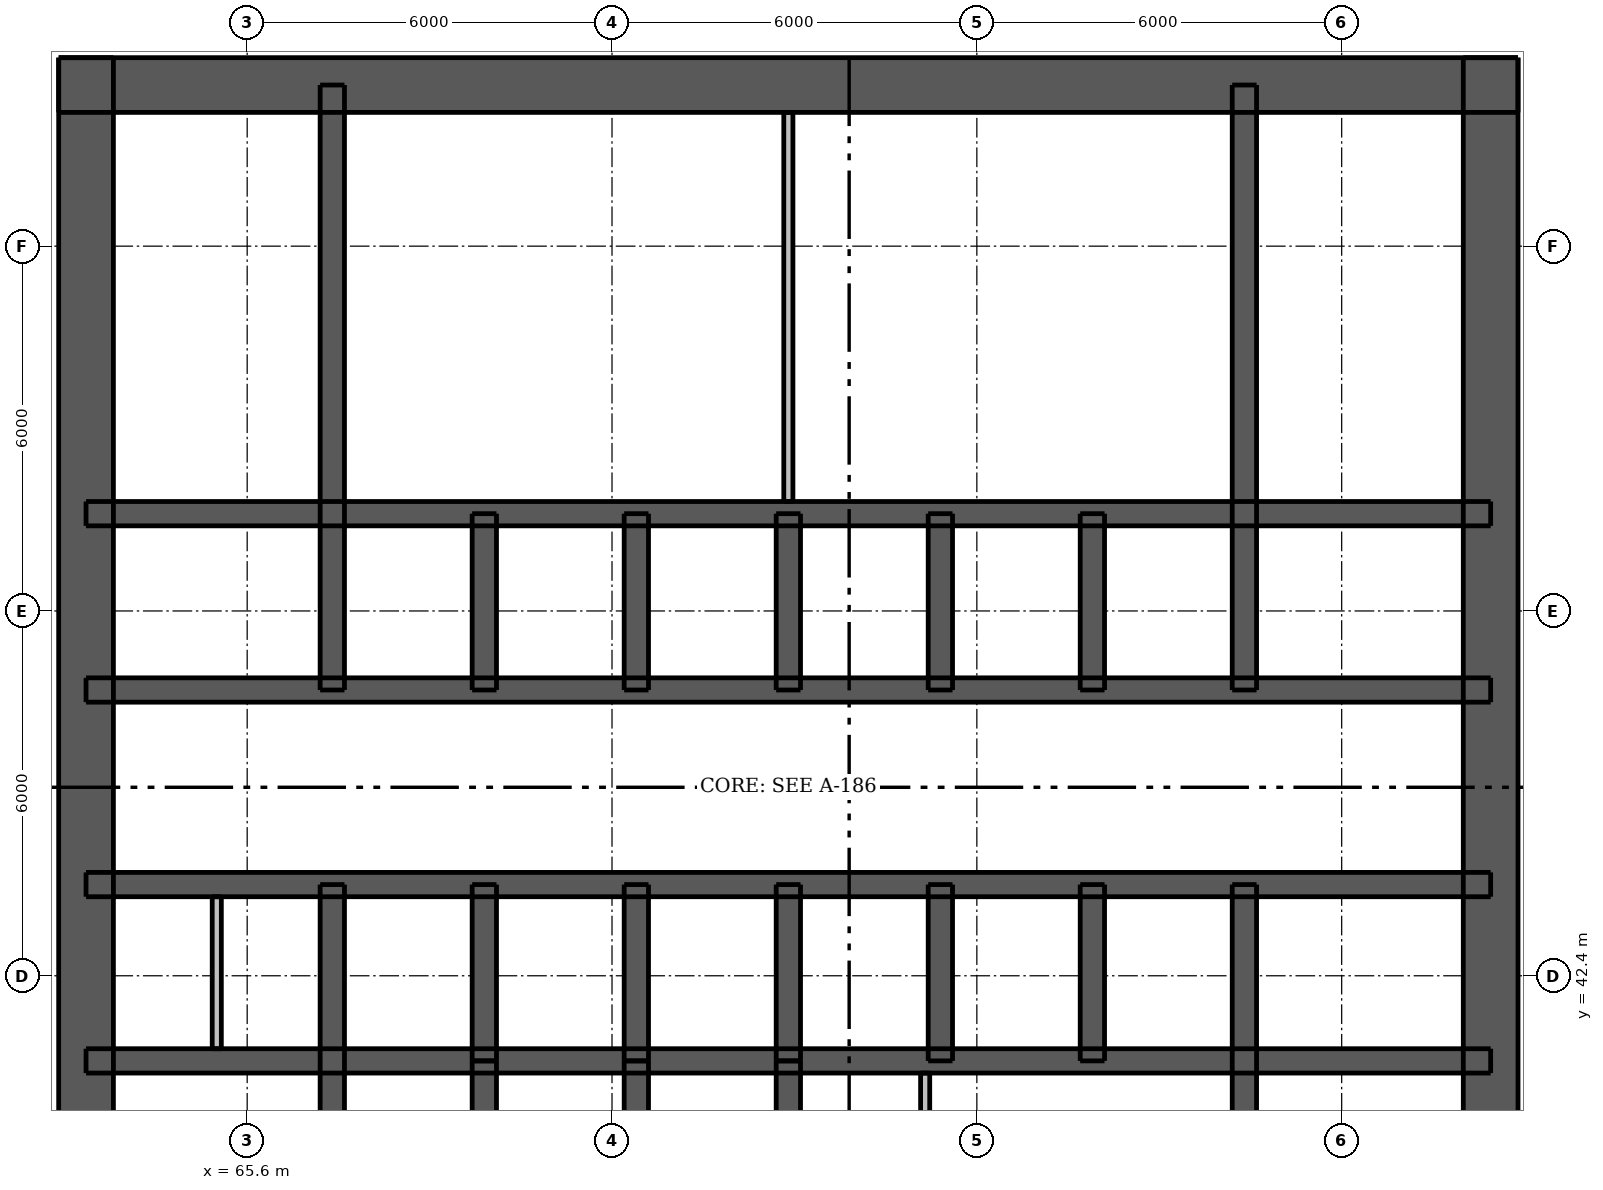
"""IFC4 building model, lengths in metres.
Left out: names, types, materials, properties, quantities, classifications, styles, units other than length and angle.
Written with IfcOpenShell. Run it as: python <this file> out.ifc"""

import sys

from ifc_helpers import new_model, si_unit, direction, frame, frame_2d, origin, place, context, subcontext, project, spatial, rectangle, extrude, element, fill, save


model = new_model("IFC4")
c1 = context("Model", 3, precision=1e-05, world=origin(), true_north=direction((0.0, 1.0)))
c2 = subcontext(c1, "Body", "Model", "MODEL_VIEW")
j1 = project(units=[si_unit("LENGTHUNIT", "METRE"), si_unit("PLANEANGLEUNIT", "RADIAN")], contexts=[c1])
p1 = place(None, origin())
s1 = spatial("IfcSite", under=j1, at=p1, CompositionType="ELEMENT")
p2 = place(p1, origin())
s2 = spatial("IfcBuilding", under=s1, at=p2, CompositionType="ELEMENT")
p3 = place(p2, frame((0.0, 0.0, 40.0)))
s3 = spatial("IfcBuildingStorey", under=s2, at=p3, CompositionType="ELEMENT", Elevation=40.0)
p4 = place(p3, frame((62.5, 57.05, 0.0), z_axis=(0.0, 0.0, 1.0), x_axis=(1.0, 0.0, 0.0)))
e1 = element("IfcWall", 1, at=p4, inside=s3, PredefinedType="SHEAR", context=c2, shape_type="SweptSolid", body=[
    extrude(rectangle(XDim=24.0, YDim=0.9, at=frame_2d((12.0, 0.0))), origin(), (0.0, 0.0, 1.0), 3.05),
])
p5 = place(p4, frame((20.85, 0.0, 0.0)))
e2 = element("IfcOpeningElement", 2, at=p5, cuts=e1, PredefinedType="OPENING", context=c2, shape_type="SweptSolid", body=[
    extrude(rectangle(XDim=1.1, YDim=2.1, at=frame_2d((0.55, 1.05))), frame((0.0, 0.46, 0.0), z_axis=(0.0, -1.0, 0.0), x_axis=(1.0, 0.0, 0.0)), (0.0, 0.0, 1.0), 0.92),
])
p6 = place(p4, frame((2.05, 0.0, 0.0)))
e3 = element("IfcOpeningElement", 3, at=p6, cuts=e1, PredefinedType="OPENING", context=c2, shape_type="SweptSolid", body=[
    extrude(rectangle(XDim=1.1, YDim=2.1, at=frame_2d((0.55, 1.05))), frame((0.0, 0.46, 0.0), z_axis=(0.0, -1.0, 0.0), x_axis=(1.0, 0.0, 0.0)), (0.0, 0.0, 1.0), 0.92),
])
p7 = place(p4, frame((7.9, 0.0, 0.0)))
e4 = element("IfcOpeningElement", 4, at=p7, cuts=e1, PredefinedType="OPENING", context=c2, shape_type="SweptSolid", body=[
    extrude(rectangle(XDim=0.9, YDim=2.1, at=frame_2d((0.45, 1.05))), frame((0.0, 0.46, 0.0), z_axis=(0.0, -1.0, 0.0), x_axis=(1.0, 0.0, 0.0)), (0.0, 0.0, 1.0), 0.92),
])
p8 = place(p4, frame((15.2, 0.0, 0.0)))
e5 = element("IfcOpeningElement", 5, at=p8, cuts=e1, PredefinedType="OPENING", context=c2, shape_type="SweptSolid", body=[
    extrude(rectangle(XDim=0.9, YDim=2.1, at=frame_2d((0.45, 1.05))), frame((0.0, 0.46, 0.0), z_axis=(0.0, -1.0, 0.0), x_axis=(1.0, 0.0, 0.0)), (0.0, 0.0, 1.0), 0.92),
])
p9 = place(p3, frame((62.95, 33.5, 0.0), z_axis=(0.0, 0.0, 1.0), x_axis=(0.0, 1.0, 0.0)))
e6 = element("IfcWall", 6, at=p9, inside=s3, PredefinedType="SHEAR", context=c2, shape_type="SweptSolid", body=[
    extrude(rectangle(XDim=24.0, YDim=0.9, at=frame_2d((12.0, 0.0))), origin(), (0.0, 0.0, 1.0), 3.05),
])
p10 = place(p9, frame((11.2, 0.0, 0.0)))
e7 = element("IfcOpeningElement", 7, at=p10, cuts=e6, PredefinedType="OPENING", context=c2, shape_type="SweptSolid", body=[
    extrude(rectangle(XDim=1.6, YDim=2.1, at=frame_2d((0.8, 1.05))), frame((0.0, 0.46, 0.0), z_axis=(0.0, -1.0, 0.0), x_axis=(1.0, 0.0, 0.0)), (0.0, 0.0, 1.0), 0.92),
])
p11 = place(p3, frame((86.05, 33.5, 0.0), z_axis=(0.0, 0.0, 1.0), x_axis=(0.0, 1.0, 0.0)))
e8 = element("IfcWall", 8, at=p11, inside=s3, PredefinedType="SHEAR", context=c2, shape_type="SweptSolid", body=[
    extrude(rectangle(XDim=24.0, YDim=0.9, at=frame_2d((12.0, 0.0))), origin(), (0.0, 0.0, 1.0), 3.05),
])
p12 = place(p11, frame((11.2, 0.0, 0.0)))
e9 = element("IfcOpeningElement", 9, at=p12, cuts=e8, PredefinedType="OPENING", context=c2, shape_type="SweptSolid", body=[
    extrude(rectangle(XDim=1.6, YDim=2.1, at=frame_2d((0.8, 1.05))), frame((0.0, 0.46, 0.0), z_axis=(0.0, -1.0, 0.0), x_axis=(1.0, 0.0, 0.0)), (0.0, 0.0, 1.0), 0.92),
])
p13 = place(p3, frame((62.95, 41.0, 0.0), z_axis=(0.0, 0.0, 1.0), x_axis=(1.0, 0.0, 0.0)))
e10 = element("IfcWall", 10, at=p13, inside=s3, PredefinedType="SHEAR", context=c2, shape_type="SweptSolid", body=[
    extrude(rectangle(XDim=23.1, YDim=0.4, at=frame_2d((11.55, 0.0))), origin(), (0.0, 0.0, 1.0), 3.05),
])
p14 = place(p3, frame((62.95, 43.9, 0.0), z_axis=(0.0, 0.0, 1.0), x_axis=(1.0, 0.0, 0.0)))
e11 = element("IfcWall", 11, at=p14, inside=s3, PredefinedType="SHEAR", context=c2, shape_type="SweptSolid", body=[
    extrude(rectangle(XDim=23.1, YDim=0.4, at=frame_2d((11.55, 0.0))), origin(), (0.0, 0.0, 1.0), 3.05),
])
p15 = place(p14, frame((0.85, 0.0, 0.0)))
e12 = element("IfcOpeningElement", 12, at=p15, cuts=e11, PredefinedType="OPENING", context=c2, shape_type="SweptSolid", body=[
    extrude(rectangle(XDim=0.9, YDim=2.1, at=frame_2d((0.45, 1.05))), frame((0.0, 0.21, 0.0), z_axis=(0.0, -1.0, 0.0), x_axis=(1.0, 0.0, 0.0)), (0.0, 0.0, 1.0), 0.42),
])
p16 = place(p14, frame((2.55, 0.0, 0.0)))
e13 = element("IfcOpeningElement", 13, at=p16, cuts=e11, PredefinedType="OPENING", context=c2, shape_type="SweptSolid", body=[
    extrude(rectangle(XDim=0.9, YDim=2.1, at=frame_2d((0.45, 1.05))), frame((0.0, 0.21, 0.0), z_axis=(0.0, -1.0, 0.0), x_axis=(1.0, 0.0, 0.0)), (0.0, 0.0, 1.0), 0.42),
])
p17 = place(p14, frame((20.5, 0.0, 0.0)))
e14 = element("IfcOpeningElement", 14, at=p17, cuts=e11, PredefinedType="OPENING", context=c2, shape_type="SweptSolid", body=[
    extrude(rectangle(XDim=0.9, YDim=2.1, at=frame_2d((0.45, 1.05))), frame((0.0, 0.21, 0.0), z_axis=(0.0, -1.0, 0.0), x_axis=(1.0, 0.0, 0.0)), (0.0, 0.0, 1.0), 0.42),
])
p18 = place(p14, frame((4.75, 0.0, 0.0)))
e15 = element("IfcOpeningElement", 15, at=p18, cuts=e11, PredefinedType="OPENING", context=c2, shape_type="SweptSolid", body=[
    extrude(rectangle(XDim=1.1, YDim=2.1, at=frame_2d((0.55, 1.05))), frame((0.0, 0.21, 0.0), z_axis=(0.0, -1.0, 0.0), x_axis=(1.0, 0.0, 0.0)), (0.0, 0.0, 1.0), 0.42),
])
p19 = place(p14, frame((7.25, 0.0, 0.0)))
e16 = element("IfcOpeningElement", 16, at=p19, cuts=e11, PredefinedType="OPENING", context=c2, shape_type="SweptSolid", body=[
    extrude(rectangle(XDim=1.1, YDim=2.1, at=frame_2d((0.55, 1.05))), frame((0.0, 0.21, 0.0), z_axis=(0.0, -1.0, 0.0), x_axis=(1.0, 0.0, 0.0)), (0.0, 0.0, 1.0), 0.42),
])
p20 = place(p14, frame((9.75, 0.0, 0.0)))
e17 = element("IfcOpeningElement", 17, at=p20, cuts=e11, PredefinedType="OPENING", context=c2, shape_type="SweptSolid", body=[
    extrude(rectangle(XDim=1.1, YDim=2.1, at=frame_2d((0.55, 1.05))), frame((0.0, 0.21, 0.0), z_axis=(0.0, -1.0, 0.0), x_axis=(1.0, 0.0, 0.0)), (0.0, 0.0, 1.0), 0.42),
])
p21 = place(p14, frame((12.25, 0.0, 0.0)))
e18 = element("IfcOpeningElement", 18, at=p21, cuts=e11, PredefinedType="OPENING", context=c2, shape_type="SweptSolid", body=[
    extrude(rectangle(XDim=1.1, YDim=2.1, at=frame_2d((0.55, 1.05))), frame((0.0, 0.21, 0.0), z_axis=(0.0, -1.0, 0.0), x_axis=(1.0, 0.0, 0.0)), (0.0, 0.0, 1.0), 0.42),
])
p22 = place(p14, frame((14.75, 0.0, 0.0)))
e19 = element("IfcOpeningElement", 19, at=p22, cuts=e11, PredefinedType="OPENING", context=c2, shape_type="SweptSolid", body=[
    extrude(rectangle(XDim=1.1, YDim=2.1, at=frame_2d((0.55, 1.05))), frame((0.0, 0.21, 0.0), z_axis=(0.0, -1.0, 0.0), x_axis=(1.0, 0.0, 0.0)), (0.0, 0.0, 1.0), 0.42),
])
p23 = place(p14, frame((17.25, 0.0, 0.0)))
e20 = element("IfcOpeningElement", 20, at=p23, cuts=e11, PredefinedType="OPENING", context=c2, shape_type="SweptSolid", body=[
    extrude(rectangle(XDim=1.1, YDim=2.1, at=frame_2d((0.55, 1.05))), frame((0.0, 0.21, 0.0), z_axis=(0.0, -1.0, 0.0), x_axis=(1.0, 0.0, 0.0)), (0.0, 0.0, 1.0), 0.42),
])
p24 = place(p3, frame((62.95, 47.1, 0.0), z_axis=(0.0, 0.0, 1.0), x_axis=(1.0, 0.0, 0.0)))
e21 = element("IfcWall", 21, at=p24, inside=s3, PredefinedType="SHEAR", context=c2, shape_type="SweptSolid", body=[
    extrude(rectangle(XDim=23.1, YDim=0.4, at=frame_2d((11.55, 0.0))), origin(), (0.0, 0.0, 1.0), 3.05),
])
p25 = place(p24, frame((1.7, 0.0, 0.0)))
e22 = element("IfcOpeningElement", 22, at=p25, cuts=e21, PredefinedType="OPENING", context=c2, shape_type="SweptSolid", body=[
    extrude(rectangle(XDim=0.9, YDim=2.1, at=frame_2d((0.45, 1.05))), frame((0.0, 0.21, 0.0), z_axis=(0.0, -1.0, 0.0), x_axis=(1.0, 0.0, 0.0)), (0.0, 0.0, 1.0), 0.42),
])
p26 = place(p24, frame((20.5, 0.0, 0.0)))
e23 = element("IfcOpeningElement", 23, at=p26, cuts=e21, PredefinedType="OPENING", context=c2, shape_type="SweptSolid", body=[
    extrude(rectangle(XDim=0.9, YDim=2.1, at=frame_2d((0.45, 1.05))), frame((0.0, 0.21, 0.0), z_axis=(0.0, -1.0, 0.0), x_axis=(1.0, 0.0, 0.0)), (0.0, 0.0, 1.0), 0.42),
])
p27 = place(p3, frame((62.95, 50.0, 0.0), z_axis=(0.0, 0.0, 1.0), x_axis=(1.0, 0.0, 0.0)))
e24 = element("IfcWall", 24, at=p27, inside=s3, PredefinedType="SHEAR", context=c2, shape_type="SweptSolid", body=[
    extrude(rectangle(XDim=23.1, YDim=0.4, at=frame_2d((11.55, 0.0))), origin(), (0.0, 0.0, 1.0), 3.05),
])
p28 = place(p3, frame((67.0, 33.95, 0.0), z_axis=(0.0, 0.0, 1.0), x_axis=(0.0, 1.0, 0.0)))
e25 = element("IfcWall", 25, at=p28, inside=s3, PredefinedType="SHEAR", context=c2, shape_type="SweptSolid", body=[
    extrude(rectangle(XDim=9.95, YDim=0.4, at=frame_2d((4.975, 0.0))), origin(), (0.0, 0.0, 1.0), 3.05),
])
p29 = place(p28, frame((0.65, 0.0, 0.0)))
e26 = element("IfcOpeningElement", 26, at=p29, cuts=e25, PredefinedType="OPENING", context=c2, shape_type="SweptSolid", body=[
    extrude(rectangle(XDim=1.1, YDim=2.1, at=frame_2d((0.55, 1.05))), frame((0.0, 0.21, 0.0), z_axis=(0.0, -1.0, 0.0), x_axis=(1.0, 0.0, 0.0)), (0.0, 0.0, 1.0), 0.42),
])
for number, where, z_axis, x_axis in (
    (27, (67.0, 47.1, 0.0), (0.0, 0.0, 1.0), (0.0, 1.0, 0.0)),
    (28, (82.0, 33.95, 0.0), (0.0, 0.0, 1.0), (0.0, 1.0, 0.0)),
    (29, (82.0, 47.1, 0.0), (0.0, 0.0, 1.0), (0.0, 1.0, 0.0)),
):
    element("IfcWall", number, at=place(p3, frame(where, z_axis=z_axis, x_axis=x_axis)), inside=s3, PredefinedType="SHEAR", context=c2, shape_type="SweptSolid", body=[
        extrude(rectangle(XDim=9.95, YDim=0.4, at=frame_2d((4.975, 0.0))), origin(), (0.0, 0.0, 1.0), 3.05),
    ])
for number, where, z_axis, x_axis in (
    (30, (69.5, 41.0, 0.0), (0.0, 0.0, 1.0), (0.0, 1.0, 0.0)),
    (31, (69.5, 47.1, 0.0), (0.0, 0.0, 1.0), (0.0, 1.0, 0.0)),
    (32, (72.0, 41.0, 0.0), (0.0, 0.0, 1.0), (0.0, 1.0, 0.0)),
    (33, (72.0, 47.1, 0.0), (0.0, 0.0, 1.0), (0.0, 1.0, 0.0)),
    (34, (74.5, 41.0, 0.0), (0.0, 0.0, 1.0), (0.0, 1.0, 0.0)),
    (35, (74.5, 47.1, 0.0), (0.0, 0.0, 1.0), (0.0, 1.0, 0.0)),
    (36, (77.0, 41.0, 0.0), (0.0, 0.0, 1.0), (0.0, 1.0, 0.0)),
    (37, (77.0, 47.1, 0.0), (0.0, 0.0, 1.0), (0.0, 1.0, 0.0)),
    (38, (79.5, 41.0, 0.0), (0.0, 0.0, 1.0), (0.0, 1.0, 0.0)),
    (39, (79.5, 47.1, 0.0), (0.0, 0.0, 1.0), (0.0, 1.0, 0.0)),
    (40, (69.5, 38.1, 0.0), (0.0, 0.0, 1.0), (0.0, 1.0, 0.0)),
    (41, (72.0, 38.1, 0.0), (0.0, 0.0, 1.0), (0.0, 1.0, 0.0)),
    (42, (74.5, 38.1, 0.0), (0.0, 0.0, 1.0), (0.0, 1.0, 0.0)),
):
    element("IfcWall", number, at=place(p3, frame(where, z_axis=z_axis, x_axis=x_axis)), inside=s3, PredefinedType="SHEAR", context=c2, shape_type="SweptSolid", body=[
        extrude(rectangle(XDim=2.9, YDim=0.4, at=frame_2d((1.45, 0.0))), origin(), (0.0, 0.0, 1.0), 3.05),
    ])
p30 = place(p3, frame((76.75, 34.4, 0.0), z_axis=(0.0, 0.0, 1.0), x_axis=(0.0, 1.0, 0.0)))
e43 = element("IfcWall", 43, at=p30, inside=s3, PredefinedType="PLUMBINGWALL", context=c2, shape_type="SweptSolid", body=[
    extrude(rectangle(XDim=6.4, YDim=0.15, at=frame_2d((3.2, 0.0))), origin(), (0.0, 0.0, 1.0), 3.05),
])
p31 = place(p3, frame((65.1, 41.2, 0.0), z_axis=(0.0, 0.0, 1.0), x_axis=(0.0, 1.0, 0.0)))
e44 = element("IfcWall", 44, at=p31, inside=s3, PredefinedType="PLUMBINGWALL", context=c2, shape_type="SweptSolid", body=[
    extrude(rectangle(XDim=2.5, YDim=0.15, at=frame_2d((1.25, 0.0))), origin(), (0.0, 0.0, 1.0), 3.05),
])
p32 = place(p3, frame((74.5, 50.2, 0.0), z_axis=(0.0, 0.0, 1.0), x_axis=(0.0, 1.0, 0.0)))
e45 = element("IfcWall", 45, at=p32, inside=s3, PredefinedType="PLUMBINGWALL", context=c2, shape_type="SweptSolid", body=[
    extrude(rectangle(XDim=6.4, YDim=0.15, at=frame_2d((3.2, 0.0))), origin(), (0.0, 0.0, 1.0), 3.05),
])
p33 = place(p5, origin())
e46 = element("IfcDoor", 46, at=p33, inside=s3, OperationType="SINGLE_SWING_RIGHT", PredefinedType="DOOR", context=c2, shape_type="SweptSolid", body=[
    extrude(rectangle(XDim=1.1, YDim=2.1, at=frame_2d((0.55, 1.05))), frame((0.0, -0.388, 0.0), z_axis=(0.0, -1.0, 0.0), x_axis=(1.0, 0.0, 0.0)), (0.0, 0.0, 1.0), 0.05),
])
fill(e2, e46)
p34 = place(p6, origin())
e47 = element("IfcDoor", 47, at=p34, inside=s3, OperationType="SINGLE_SWING_LEFT", PredefinedType="DOOR", context=c2, shape_type="SweptSolid", body=[
    extrude(rectangle(XDim=1.1, YDim=2.1, at=frame_2d((0.55, 1.05))), frame((0.0, -0.388, 0.0), z_axis=(0.0, -1.0, 0.0), x_axis=(1.0, 0.0, 0.0)), (0.0, 0.0, 1.0), 0.05),
])
fill(e3, e47)
p35 = place(p10, origin())
e48 = element("IfcDoor", 48, at=p35, inside=s3, OperationType="DOUBLE_DOOR_SINGLE_SWING", PredefinedType="DOOR", context=c2, shape_type="SweptSolid", body=[
    extrude(rectangle(XDim=1.6, YDim=2.1, at=frame_2d((0.8, 1.05))), frame((0.0, -0.388, 0.0), z_axis=(0.0, -1.0, 0.0), x_axis=(1.0, 0.0, 0.0)), (0.0, 0.0, 1.0), 0.05),
])
fill(e7, e48)
p36 = place(p12, origin())
e49 = element("IfcDoor", 49, at=p36, inside=s3, OperationType="DOUBLE_DOOR_SINGLE_SWING", PredefinedType="DOOR", context=c2, shape_type="SweptSolid", body=[
    extrude(rectangle(XDim=1.6, YDim=2.1, at=frame_2d((0.8, 1.05))), frame((0.0, 0.438, 0.0), z_axis=(0.0, -1.0, 0.0), x_axis=(1.0, 0.0, 0.0)), (0.0, 0.0, 1.0), 0.05),
])
fill(e9, e49)
p37 = place(p15, origin())
e50 = element("IfcDoor", 50, at=p37, inside=s3, OperationType="SINGLE_SWING_LEFT", PredefinedType="DOOR", context=c2, shape_type="SweptSolid", body=[
    extrude(rectangle(XDim=0.9, YDim=2.1, at=frame_2d((0.45, 1.05))), frame((0.0, -0.138, 0.0), z_axis=(0.0, -1.0, 0.0), x_axis=(1.0, 0.0, 0.0)), (0.0, 0.0, 1.0), 0.05),
])
fill(e12, e50)
p38 = place(p16, origin())
e51 = element("IfcDoor", 51, at=p38, inside=s3, OperationType="SINGLE_SWING_RIGHT", PredefinedType="DOOR", context=c2, shape_type="SweptSolid", body=[
    extrude(rectangle(XDim=0.9, YDim=2.1, at=frame_2d((0.45, 1.05))), frame((0.0, -0.138, 0.0), z_axis=(0.0, -1.0, 0.0), x_axis=(1.0, 0.0, 0.0)), (0.0, 0.0, 1.0), 0.05),
])
fill(e13, e51)
p39 = place(p17, origin())
e52 = element("IfcDoor", 52, at=p39, inside=s3, OperationType="SINGLE_SWING_LEFT", PredefinedType="DOOR", context=c2, shape_type="SweptSolid", body=[
    extrude(rectangle(XDim=0.9, YDim=2.1, at=frame_2d((0.45, 1.05))), frame((0.0, -0.138, 0.0), z_axis=(0.0, -1.0, 0.0), x_axis=(1.0, 0.0, 0.0)), (0.0, 0.0, 1.0), 0.05),
])
fill(e14, e52)
p40 = place(p25, origin())
e53 = element("IfcDoor", 53, at=p40, inside=s3, OperationType="SINGLE_SWING_LEFT", PredefinedType="DOOR", context=c2, shape_type="SweptSolid", body=[
    extrude(rectangle(XDim=0.9, YDim=2.1, at=frame_2d((0.45, 1.05))), frame((0.0, 0.188, 0.0), z_axis=(0.0, -1.0, 0.0), x_axis=(1.0, 0.0, 0.0)), (0.0, 0.0, 1.0), 0.05),
])
fill(e22, e53)
p41 = place(p26, origin())
e54 = element("IfcDoor", 54, at=p41, inside=s3, OperationType="SINGLE_SWING_LEFT", PredefinedType="DOOR", context=c2, shape_type="SweptSolid", body=[
    extrude(rectangle(XDim=0.9, YDim=2.1, at=frame_2d((0.45, 1.05))), frame((0.0, 0.188, 0.0), z_axis=(0.0, -1.0, 0.0), x_axis=(1.0, 0.0, 0.0)), (0.0, 0.0, 1.0), 0.05),
])
fill(e23, e54)
p42 = place(p7, origin())
e55 = element("IfcDoor", 55, at=p42, inside=s3, OperationType="SINGLE_SWING_RIGHT", PredefinedType="DOOR", context=c2, shape_type="SweptSolid", body=[
    extrude(rectangle(XDim=0.9, YDim=2.1, at=frame_2d((0.45, 1.05))), frame((0.0, -0.388, 0.0), z_axis=(0.0, -1.0, 0.0), x_axis=(1.0, 0.0, 0.0)), (0.0, 0.0, 1.0), 0.05),
])
fill(e4, e55)
p43 = place(p8, origin())
e56 = element("IfcDoor", 56, at=p43, inside=s3, OperationType="SINGLE_SWING_RIGHT", PredefinedType="DOOR", context=c2, shape_type="SweptSolid", body=[
    extrude(rectangle(XDim=0.9, YDim=2.1, at=frame_2d((0.45, 1.05))), frame((0.0, -0.388, 0.0), z_axis=(0.0, -1.0, 0.0), x_axis=(1.0, 0.0, 0.0)), (0.0, 0.0, 1.0), 0.05),
])
fill(e5, e56)
p44 = place(p18, origin())
e57 = element("IfcDoor", 57, at=p44, inside=s3, OperationType="DOUBLE_DOOR_SLIDING", PredefinedType="DOOR", context=c2, shape_type="SweptSolid", body=[
    extrude(rectangle(XDim=1.1, YDim=2.1, at=frame_2d((0.55, 1.05))), frame((0.0, 0.025, 0.0), z_axis=(0.0, -1.0, 0.0), x_axis=(1.0, 0.0, 0.0)), (0.0, 0.0, 1.0), 0.05),
])
fill(e15, e57)
p45 = place(p19, origin())
e58 = element("IfcDoor", 58, at=p45, inside=s3, OperationType="DOUBLE_DOOR_SLIDING", PredefinedType="DOOR", context=c2, shape_type="SweptSolid", body=[
    extrude(rectangle(XDim=1.1, YDim=2.1, at=frame_2d((0.55, 1.05))), frame((0.0, 0.025, 0.0), z_axis=(0.0, -1.0, 0.0), x_axis=(1.0, 0.0, 0.0)), (0.0, 0.0, 1.0), 0.05),
])
fill(e16, e58)
p46 = place(p20, origin())
e59 = element("IfcDoor", 59, at=p46, inside=s3, OperationType="DOUBLE_DOOR_SLIDING", PredefinedType="DOOR", context=c2, shape_type="SweptSolid", body=[
    extrude(rectangle(XDim=1.1, YDim=2.1, at=frame_2d((0.55, 1.05))), frame((0.0, 0.025, 0.0), z_axis=(0.0, -1.0, 0.0), x_axis=(1.0, 0.0, 0.0)), (0.0, 0.0, 1.0), 0.05),
])
fill(e17, e59)
p47 = place(p21, origin())
e60 = element("IfcDoor", 60, at=p47, inside=s3, OperationType="DOUBLE_DOOR_SLIDING", PredefinedType="DOOR", context=c2, shape_type="SweptSolid", body=[
    extrude(rectangle(XDim=1.1, YDim=2.1, at=frame_2d((0.55, 1.05))), frame((0.0, 0.025, 0.0), z_axis=(0.0, -1.0, 0.0), x_axis=(1.0, 0.0, 0.0)), (0.0, 0.0, 1.0), 0.05),
])
fill(e18, e60)
p48 = place(p22, origin())
e61 = element("IfcDoor", 61, at=p48, inside=s3, OperationType="DOUBLE_DOOR_SLIDING", PredefinedType="DOOR", context=c2, shape_type="SweptSolid", body=[
    extrude(rectangle(XDim=1.1, YDim=2.1, at=frame_2d((0.55, 1.05))), frame((0.0, 0.025, 0.0), z_axis=(0.0, -1.0, 0.0), x_axis=(1.0, 0.0, 0.0)), (0.0, 0.0, 1.0), 0.05),
])
fill(e19, e61)
p49 = place(p23, origin())
e62 = element("IfcDoor", 62, at=p49, inside=s3, OperationType="DOUBLE_DOOR_SLIDING", PredefinedType="DOOR", context=c2, shape_type="SweptSolid", body=[
    extrude(rectangle(XDim=1.1, YDim=2.1, at=frame_2d((0.55, 1.05))), frame((0.0, 0.025, 0.0), z_axis=(0.0, -1.0, 0.0), x_axis=(1.0, 0.0, 0.0)), (0.0, 0.0, 1.0), 0.05),
])
fill(e20, e62)
save(model, sys.argv[1])
